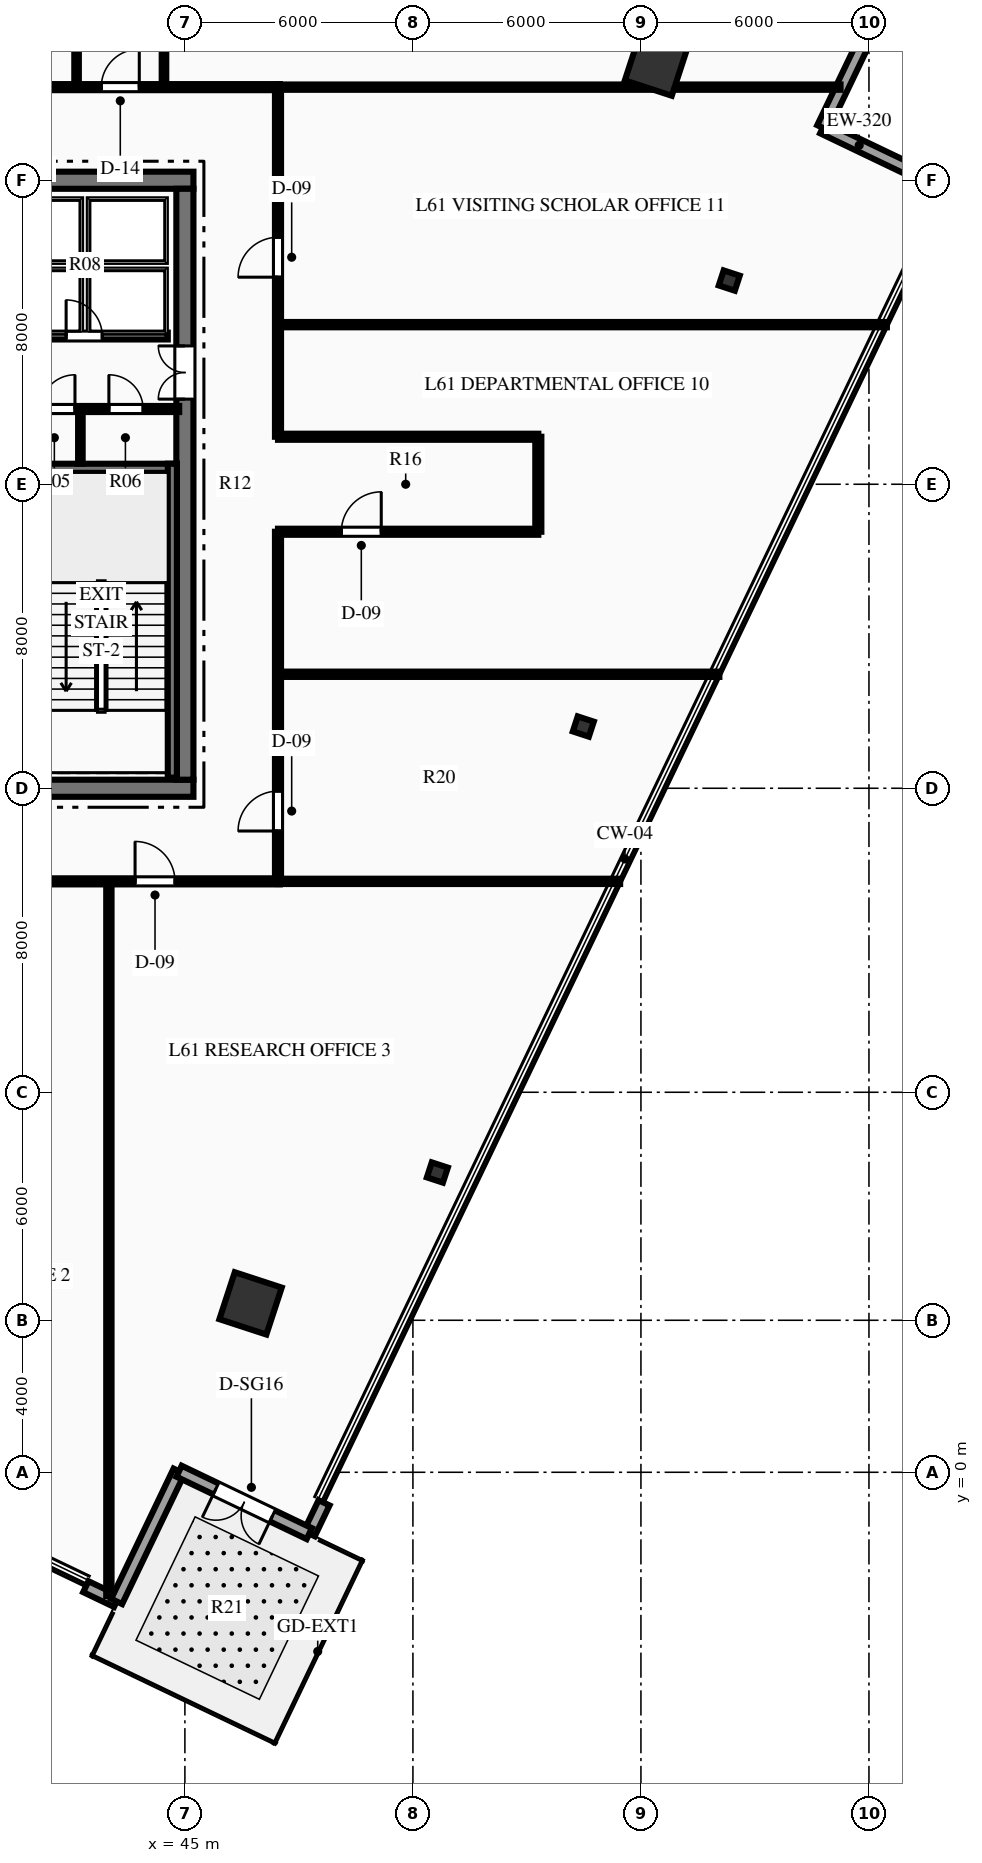
"""IFC4 building model, lengths in metres.
Left out: names, types, materials, properties, quantities, classifications, styles, units other than length and angle.
Written with IfcOpenShell. Run it as: python <this file> out.ifc"""

import sys

from ifc_helpers import new_model, si_unit, direction, frame, frame_2d, origin, origin_2d, place, context, subcontext, project, spatial, rectangle, hollow_rectangle, i_section, extrude, element, fill, save


model = new_model("IFC4")
c1 = context("Model", 3, precision=1e-05, world=origin(), true_north=direction((0.0, 1.0)))
c2 = subcontext(c1, "Body", "Model", "MODEL_VIEW")
j1 = project(units=[si_unit("LENGTHUNIT", "METRE"), si_unit("PLANEANGLEUNIT", "RADIAN")], contexts=[c1])
p1 = place(None, origin())
s1 = spatial("IfcSite", under=j1, at=p1, CompositionType="ELEMENT")
p2 = place(p1, origin())
s2 = spatial("IfcBuilding", under=s1, at=p2, CompositionType="ELEMENT")
p3 = place(p2, frame((0.0, 0.0, 244.2)))
s3 = spatial("IfcBuildingStorey", under=s2, at=p3, CompositionType="ELEMENT", Elevation=244.2)
p4 = place(p3, frame((26.775, 18.0, 0.0), z_axis=(0.0, 0.0, 1.0), x_axis=(1.0, 0.0, 0.0)))
e1 = element("IfcWall", 1, at=p4, inside=s3, PredefinedType="SHEAR", context=c2, shape_type="SweptSolid", body=[
    extrude(rectangle(XDim=18.45, YDim=0.45, at=frame_2d((9.225, 0.0))), origin(), (0.0, 0.0, 1.0), 4.5),
])
p5 = place(p4, frame((7.325, 0.0, 0.0)))
e2 = element("IfcOpeningElement", 2, at=p5, cuts=e1, PredefinedType="OPENING", context=c2, shape_type="SweptSolid", body=[
    extrude(rectangle(XDim=1.1, YDim=2.15, at=frame_2d((0.55, 1.075))), frame((0.0, 0.235, 0.0), z_axis=(0.0, -1.0, 0.0), x_axis=(1.0, 0.0, 0.0)), (0.0, 0.0, 1.0), 0.47),
])
p6 = place(p4, frame((10.025, 0.0, 0.0)))
e3 = element("IfcOpeningElement", 3, at=p6, cuts=e1, PredefinedType="OPENING", context=c2, shape_type="SweptSolid", body=[
    extrude(rectangle(XDim=1.1, YDim=2.15, at=frame_2d((0.55, 1.075))), frame((0.0, 0.235, 0.0), z_axis=(0.0, -1.0, 0.0), x_axis=(1.0, 0.0, 0.0)), (0.0, 0.0, 1.0), 0.47),
])
p7 = place(p3, frame((26.775, 34.0, 0.0), z_axis=(0.0, 0.0, 1.0), x_axis=(1.0, 0.0, 0.0)))
e4 = element("IfcWall", 4, at=p7, inside=s3, PredefinedType="SHEAR", context=c2, shape_type="SweptSolid", body=[
    extrude(rectangle(XDim=18.45, YDim=0.45, at=frame_2d((9.225, 0.0))), origin(), (0.0, 0.0, 1.0), 4.5),
])
p8 = place(p3, frame((45.0, 18.225, 0.0), z_axis=(0.0, 0.0, 1.0), x_axis=(0.0, 1.0, 0.0)))
e5 = element("IfcWall", 5, at=p8, inside=s3, PredefinedType="SHEAR", context=c2, shape_type="SweptSolid", body=[
    extrude(rectangle(XDim=15.55, YDim=0.45, at=frame_2d((7.775, 0.0))), origin(), (0.0, 0.0, 1.0), 4.5),
])
p9 = place(p8, frame((10.015, 0.0, 0.0)))
e6 = element("IfcOpeningElement", 6, at=p9, cuts=e5, PredefinedType="OPENING", context=c2, shape_type="SweptSolid", body=[
    extrude(rectangle(XDim=1.4, YDim=2.2, at=frame_2d((0.7, 1.1))), frame((0.0, 0.235, 0.0), z_axis=(0.0, -1.0, 0.0), x_axis=(1.0, 0.0, 0.0)), (0.0, 0.0, 1.0), 0.47),
])
p10 = place(p3, frame((40.81, 26.42, 0.0), z_axis=(0.0, 0.0, 1.0), x_axis=(1.0, 0.0, 0.0)))
e7 = element("IfcWall", 7, at=p10, inside=s3, PredefinedType="SHEAR", context=c2, shape_type="SweptSolid", body=[
    extrude(rectangle(XDim=3.98, YDim=0.24, at=frame_2d((1.99, 0.0))), origin(), (0.0, 0.0, 1.0), 4.5),
])
p11 = place(p3, frame((44.67, 18.28, 0.0), z_axis=(0.0, 0.0, 1.0), x_axis=(0.0, 1.0, 0.0)))
e8 = element("IfcWall", 8, at=p11, inside=s3, PredefinedType="SHEAR", context=c2, shape_type="SweptSolid", body=[
    extrude(rectangle(XDim=8.26, YDim=0.24, at=frame_2d((4.13, 0.0))), origin(), (0.0, 0.0, 1.0), 4.5),
])
for number, where, z_axis, x_axis in (
    (9, (46.728, 4.445, 0.0), (0.0, 0.0, 1.0), (0.311, 0.95, 0.0)),
    (10, (57.396, 37.043, 0.0), (0.0, 0.0, 1.0), (0.311, 0.95, 0.0)),
):
    element("IfcColumn", number, at=place(p3, frame(where, z_axis=z_axis, x_axis=x_axis)), inside=s3, PredefinedType="COLUMN", context=c2, shape_type="SweptSolid", body=[
        extrude(hollow_rectangle(XDim=1.3, YDim=1.3, WallThickness=0.06, at=origin_2d()), origin(), (0.0, 0.0, 1.0), 4.5),
    ])
for number, where, z_axis, x_axis in (
    (11, (51.643, 7.889, 0.0), (0.0, 0.0, 1.0), (0.311, 0.95, 0.0)),
    (12, (55.483, 19.624, 0.0), (0.0, 0.0, 1.0), (0.311, 0.95, 0.0)),
    (13, (59.324, 31.36, 0.0), (0.0, 0.0, 1.0), (0.311, 0.95, 0.0)),
):
    element("IfcColumn", number, at=place(p3, frame(where, z_axis=z_axis, x_axis=x_axis)), inside=s3, PredefinedType="COLUMN", context=c2, shape_type="SweptSolid", body=[
        extrude(i_section(OverallWidth=0.416, OverallDepth=0.445, WebThickness=0.039, FlangeThickness=0.063, at=origin_2d()), origin(), (0.0, 0.0, 1.0), 4.5),
    ])
p12 = place(p3, frame((48.662, -0.802, 0.0), z_axis=(0.0, 0.0, 1.0), x_axis=(-0.432069629268, -0.901840249414, 0.0)))
e14 = element("IfcWall", 14, at=p12, inside=s3, PredefinedType="STANDARD", context=c2, shape_type="SweptSolid", body=[
    extrude(rectangle(XDim=0.9, YDim=0.32, at=frame_2d((0.45, 0.0))), origin(), (0.0, 0.0, 1.0), 4.23),
])
p13 = place(p3, frame((61.784, 35.38, 0.0), z_axis=(0.0, 0.0, 1.0), x_axis=(0.901805596144, -0.432141952099, 0.0)))
e15 = element("IfcWall", 15, at=p13, inside=s3, PredefinedType="STANDARD", context=c2, shape_type="SweptSolid", body=[
    extrude(rectangle(XDim=3.8, YDim=0.32, at=frame_2d((1.9, 0.0))), origin(), (0.0, 0.0, 1.0), 4.23),
])
p14 = place(p3, frame((63.426, 38.807, 0.0), z_axis=(0.0, 0.0, 1.0), x_axis=(-0.432064663211, -0.901842628624, 0.0)))
e16 = element("IfcWall", 16, at=p14, inside=s3, PredefinedType="STANDARD", context=c2, shape_type="SweptSolid", body=[
    extrude(rectangle(XDim=3.8, YDim=0.32, at=frame_2d((1.9, 0.0))), origin(), (0.0, 0.0, 1.0), 4.23),
])
p15 = place(p3, frame((43.204, -3.399, 0.0), z_axis=(0.0, 0.0, 1.0), x_axis=(-0.901789596457, 0.432175339096, 0.0)))
e17 = element("IfcWall", 17, at=p15, inside=s3, PredefinedType="STANDARD", context=c2, shape_type="SweptSolid", body=[
    extrude(rectangle(XDim=0.9, YDim=0.32, at=frame_2d((0.45, 0.0))), origin(), (0.0, 0.0, 1.0), 4.23),
])
p16 = place(p3, frame((44.846, 0.028, 0.0), z_axis=(0.0, 0.0, 1.0), x_axis=(-0.432064663211, -0.901842628624, 0.0)))
e18 = element("IfcWall", 18, at=p16, inside=s3, PredefinedType="STANDARD", context=c2, shape_type="SweptSolid", body=[
    extrude(rectangle(XDim=3.8, YDim=0.32, at=frame_2d((1.9, 0.0))), origin(), (0.0, 0.0, 1.0), 4.23),
])
p17 = place(p3, frame((48.273, -1.614, 0.0), z_axis=(0.0, 0.0, 1.0), x_axis=(-0.901817593476, 0.432116914848, 0.0)))
e19 = element("IfcWall", 19, at=p17, inside=s3, PredefinedType="STANDARD", context=c2, shape_type="SweptSolid", body=[
    extrude(rectangle(XDim=3.8, YDim=0.32, at=frame_2d((1.9, 0.0))), origin(), (0.0, 0.0, 1.0), 4.23),
])
p18 = place(p17, frame((1.075, 0.0, 0.0)))
e20 = element("IfcOpeningElement", 20, at=p18, cuts=e19, PredefinedType="OPENING", context=c2, shape_type="SweptSolid", body=[
    extrude(rectangle(XDim=1.65, YDim=2.35, at=frame_2d((0.825, 1.175))), frame((0.0, 0.17, 0.0), z_axis=(0.0, -1.0, 0.0), x_axis=(1.0, 0.0, 0.0)), (0.0, 0.0, 1.0), 0.34),
])
p19 = place(p3, frame((40.8, 27.98, 0.0), z_axis=(0.0, 0.0, 1.0), x_axis=(1.0, 0.0, 0.0)))
e21 = element("IfcWall", 21, at=p19, inside=s3, PredefinedType="PARTITIONING", context=c2, shape_type="SweptSolid", body=[
    extrude(rectangle(XDim=4.05, YDim=0.16, at=frame_2d((2.025, 0.0))), origin(), (0.0, 0.0, 1.0), 4.23),
])
p20 = place(p19, frame((0.407, 0.0, 0.0)))
e22 = element("IfcOpeningElement", 22, at=p20, cuts=e21, PredefinedType="OPENING", context=c2, shape_type="SweptSolid", body=[
    extrude(rectangle(XDim=0.9, YDim=2.15, at=frame_2d((0.45, 1.075))), frame((0.0, 0.09, 0.0), z_axis=(0.0, -1.0, 0.0), x_axis=(1.0, 0.0, 0.0)), (0.0, 0.0, 1.0), 0.18),
])
p21 = place(p19, frame((2.2, 0.0, 0.0)))
e23 = element("IfcOpeningElement", 23, at=p21, cuts=e21, PredefinedType="OPENING", context=c2, shape_type="SweptSolid", body=[
    extrude(rectangle(XDim=0.9, YDim=2.15, at=frame_2d((0.45, 1.075))), frame((0.0, 0.09, 0.0), z_axis=(0.0, -1.0, 0.0), x_axis=(1.0, 0.0, 0.0)), (0.0, 0.0, 1.0), 0.18),
])
p22 = place(p3, frame((42.25, 26.54, 0.0), z_axis=(0.0, 0.0, 1.0), x_axis=(0.0, 1.0, 0.0)))
e24 = element("IfcWall", 24, at=p22, inside=s3, PredefinedType="PARTITIONING", context=c2, shape_type="SweptSolid", body=[
    extrude(rectangle(XDim=1.44, YDim=0.12, at=frame_2d((0.72, 0.0))), origin(), (0.0, 0.0, 1.0), 4.23),
])
p23 = place(p3, frame((40.12, 29.9, 0.0), z_axis=(0.0, 0.0, 1.0), x_axis=(1.0, 0.0, 0.0)))
e25 = element("IfcWall", 25, at=p23, inside=s3, PredefinedType="PARTITIONING", context=c2, shape_type="SweptSolid", body=[
    extrude(rectangle(XDim=4.43, YDim=0.18, at=frame_2d((2.215, 0.0))), origin(), (0.0, 0.0, 1.0), 4.23),
])
p24 = place(p23, frame((1.755, 0.0, 0.0)))
e26 = element("IfcOpeningElement", 26, at=p24, cuts=e25, PredefinedType="OPENING", context=c2, shape_type="SweptSolid", body=[
    extrude(rectangle(XDim=0.95, YDim=2.15, at=frame_2d((0.475, 1.075))), frame((0.0, 0.1, 0.0), z_axis=(0.0, -1.0, 0.0), x_axis=(1.0, 0.0, 0.0)), (0.0, 0.0, 1.0), 0.2),
])
p25 = place(p3, frame((37.25, 15.55, 0.0), z_axis=(0.0, 0.0, 1.0), x_axis=(1.0, 0.0, 0.0)))
e27 = element("IfcWall", 27, at=p25, inside=s3, PredefinedType="PARTITIONING", context=c2, shape_type="SweptSolid", body=[
    extrude(rectangle(XDim=10.25, YDim=0.16, at=frame_2d((5.125, 0.0))), origin(), (0.0, 0.0, 1.0), 4.23),
])
p26 = place(p25, frame((6.439, 0.0, 0.0)))
e28 = element("IfcOpeningElement", 28, at=p26, cuts=e27, PredefinedType="OPENING", context=c2, shape_type="SweptSolid", body=[
    extrude(rectangle(XDim=1.05, YDim=2.15, at=frame_2d((0.525, 1.075))), frame((0.0, 0.09, 0.0), z_axis=(0.0, -1.0, 0.0), x_axis=(1.0, 0.0, 0.0)), (0.0, 0.0, 1.0), 0.18),
])
p27 = place(p3, frame((37.25, 36.45, 0.0), z_axis=(0.0, 0.0, 1.0), x_axis=(1.0, 0.0, 0.0)))
e29 = element("IfcWall", 29, at=p27, inside=s3, PredefinedType="PARTITIONING", context=c2, shape_type="SweptSolid", body=[
    extrude(rectangle(XDim=10.25, YDim=0.16, at=frame_2d((5.125, 0.0))), origin(), (0.0, 0.0, 1.0), 4.23),
])
p28 = place(p27, frame((1.0, 0.0, 0.0)))
e30 = element("IfcOpeningElement", 30, at=p28, cuts=e29, PredefinedType="OPENING", context=c2, shape_type="SweptSolid", body=[
    extrude(rectangle(XDim=0.9, YDim=2.15, at=frame_2d((0.45, 1.075))), frame((0.0, 0.09, 0.0), z_axis=(0.0, -1.0, 0.0), x_axis=(1.0, 0.0, 0.0)), (0.0, 0.0, 1.0), 0.18),
])
p29 = place(p27, frame((3.3, 0.0, 0.0)))
e31 = element("IfcOpeningElement", 31, at=p29, cuts=e29, PredefinedType="OPENING", context=c2, shape_type="SweptSolid", body=[
    extrude(rectangle(XDim=0.9, YDim=2.15, at=frame_2d((0.45, 1.075))), frame((0.0, 0.09, 0.0), z_axis=(0.0, -1.0, 0.0), x_axis=(1.0, 0.0, 0.0)), (0.0, 0.0, 1.0), 0.18),
])
p30 = place(p27, frame((5.55, 0.0, 0.0)))
e32 = element("IfcOpeningElement", 32, at=p30, cuts=e29, PredefinedType="OPENING", context=c2, shape_type="SweptSolid", body=[
    extrude(rectangle(XDim=1.0, YDim=2.15, at=frame_2d((0.5, 1.075))), frame((0.0, 0.09, 0.0), z_axis=(0.0, -1.0, 0.0), x_axis=(1.0, 0.0, 0.0)), (0.0, 0.0, 1.0), 0.18),
])
p31 = place(p3, frame((47.45, 15.55, 0.0), z_axis=(0.0, 0.0, 1.0), x_axis=(0.0, 1.0, 0.0)))
e33 = element("IfcWall", 33, at=p31, inside=s3, PredefinedType="PARTITIONING", context=c2, shape_type="SweptSolid", body=[
    extrude(rectangle(XDim=9.2, YDim=0.16, at=frame_2d((4.6, 0.0))), origin(), (0.0, 0.0, 1.0), 4.23),
])
p32 = place(p31, frame((1.325, 0.0, 0.0)))
e34 = element("IfcOpeningElement", 34, at=p32, cuts=e33, PredefinedType="OPENING", context=c2, shape_type="SweptSolid", body=[
    extrude(rectangle(XDim=1.05, YDim=2.15, at=frame_2d((0.525, 1.075))), frame((0.0, 0.09, 0.0), z_axis=(0.0, -1.0, 0.0), x_axis=(1.0, 0.0, 0.0)), (0.0, 0.0, 1.0), 0.18),
])
p33 = place(p3, frame((47.45, 27.25, 0.0), z_axis=(0.0, 0.0, 1.0), x_axis=(0.0, 1.0, 0.0)))
e35 = element("IfcWall", 35, at=p33, inside=s3, PredefinedType="PARTITIONING", context=c2, shape_type="SweptSolid", body=[
    extrude(rectangle(XDim=9.2, YDim=0.16, at=frame_2d((4.6, 0.0))), origin(), (0.0, 0.0, 1.0), 4.23),
])
p34 = place(p33, frame((4.199, 0.0, 0.0)))
e36 = element("IfcOpeningElement", 36, at=p34, cuts=e35, PredefinedType="OPENING", context=c2, shape_type="SweptSolid", body=[
    extrude(rectangle(XDim=1.05, YDim=2.15, at=frame_2d((0.525, 1.075))), frame((0.0, 0.09, 0.0), z_axis=(0.0, -1.0, 0.0), x_axis=(1.0, 0.0, 0.0)), (0.0, 0.0, 1.0), 0.18),
])
p35 = place(p3, frame((47.45, 24.75, 0.0), z_axis=(0.0, 0.0, 1.0), x_axis=(1.0, 0.0, 0.0)))
e37 = element("IfcWall", 37, at=p35, inside=s3, PredefinedType="PARTITIONING", context=c2, shape_type="SweptSolid", body=[
    extrude(rectangle(XDim=6.85, YDim=0.16, at=frame_2d((3.425, 0.0))), origin(), (0.0, 0.0, 1.0), 4.23),
])
p36 = place(p35, frame((1.667, 0.0, 0.0)))
e38 = element("IfcOpeningElement", 38, at=p36, cuts=e37, PredefinedType="OPENING", context=c2, shape_type="SweptSolid", body=[
    extrude(rectangle(XDim=1.05, YDim=2.15, at=frame_2d((0.525, 1.075))), frame((0.0, 0.09, 0.0), z_axis=(0.0, -1.0, 0.0), x_axis=(1.0, 0.0, 0.0)), (0.0, 0.0, 1.0), 0.18),
])
p37 = place(p3, frame((47.45, 27.25, 0.0), z_axis=(0.0, 0.0, 1.0), x_axis=(1.0, 0.0, 0.0)))
e39 = element("IfcWall", 39, at=p37, inside=s3, PredefinedType="PARTITIONING", context=c2, shape_type="SweptSolid", body=[
    extrude(rectangle(XDim=6.85, YDim=0.16, at=frame_2d((3.425, 0.0))), origin(), (0.0, 0.0, 1.0), 4.23),
])
p38 = place(p3, frame((54.3, 24.75, 0.0), z_axis=(0.0, 0.0, 1.0), x_axis=(0.0, 1.0, 0.0)))
e40 = element("IfcWall", 40, at=p38, inside=s3, PredefinedType="PARTITIONING", context=c2, shape_type="SweptSolid", body=[
    extrude(rectangle(XDim=2.5, YDim=0.16, at=frame_2d((1.25, 0.0))), origin(), (0.0, 0.0, 1.0), 4.23),
])
for number, where, z_axis, x_axis in (
    (41, (42.15, 36.45, 0.0), (0.0, 0.0, 1.0), (0.0, 1.0, 0.0)),
    (42, (44.45, 36.45, 0.0), (0.0, 0.0, 1.0), (0.0, 1.0, 0.0)),
):
    element("IfcWall", number, at=place(p3, frame(where, z_axis=z_axis, x_axis=x_axis)), inside=s3, PredefinedType="PARTITIONING", context=c2, shape_type="SweptSolid", body=[
        extrude(rectangle(XDim=3.9, YDim=0.12, at=frame_2d((1.95, 0.0))), origin(), (0.0, 0.0, 1.0), 4.23),
    ])
p39 = place(p3, frame((47.45, 15.55, 0.0), z_axis=(0.0, 0.0, 1.0), x_axis=(1.0, 0.0, 0.0)))
e43 = element("IfcWall", 43, at=p39, inside=s3, PredefinedType="PARTITIONING", context=c2, shape_type="SweptSolid", body=[
    extrude(rectangle(XDim=9.002, YDim=0.14, at=frame_2d((4.501, 0.0))), origin(), (0.0, 0.0, 1.0), 4.23),
])
p40 = place(p3, frame((47.45, 36.45, 0.0), z_axis=(0.0, 0.0, 1.0), x_axis=(1.0, 0.0, 0.0)))
e44 = element("IfcWall", 44, at=p40, inside=s3, PredefinedType="PARTITIONING", context=c2, shape_type="SweptSolid", body=[
    extrude(rectangle(XDim=14.802, YDim=0.14, at=frame_2d((7.401, 0.0))), origin(), (0.0, 0.0, 1.0), 3.608),
])
p41 = place(p3, frame((43.0, -3.257, 0.0), z_axis=(0.0, 0.0, 1.0), x_axis=(0.0, 1.0, 0.0)))
e45 = element("IfcWall", 45, at=p41, inside=s3, PredefinedType="PARTITIONING", context=c2, shape_type="SweptSolid", body=[
    extrude(rectangle(XDim=18.807, YDim=0.14, at=frame_2d((9.403, 0.0))), origin(), (0.0, 0.0, 1.0), 4.23),
])
p42 = place(p3, frame((47.45, 21.0, 0.0), z_axis=(0.0, 0.0, 1.0), x_axis=(1.0, 0.0, 0.0)))
e46 = element("IfcWall", 46, at=p42, inside=s3, PredefinedType="PARTITIONING", context=c2, shape_type="SweptSolid", body=[
    extrude(rectangle(XDim=11.614, YDim=0.14, at=frame_2d((5.807, 0.0))), origin(), (0.0, 0.0, 1.0), 4.23),
])
p43 = place(p3, frame((47.45, 30.2, 0.0), z_axis=(0.0, 0.0, 1.0), x_axis=(1.0, 0.0, 0.0)))
e47 = element("IfcWall", 47, at=p43, inside=s3, PredefinedType="PARTITIONING", context=c2, shape_type="SweptSolid", body=[
    extrude(rectangle(XDim=16.022, YDim=0.14, at=frame_2d((8.011, 0.0))), origin(), (0.0, 0.0, 1.0), 4.23),
])
p44 = place(p18, origin())
e48 = element("IfcDoor", 48, at=p44, inside=s3, OperationType="DOUBLE_DOOR_SINGLE_SWING", PredefinedType="DOOR", context=c2, shape_type="SweptSolid", body=[
    extrude(rectangle(XDim=1.65, YDim=2.35, at=frame_2d((0.825, 1.175))), frame((0.0, 0.025, 0.0), z_axis=(0.0, -1.0, 0.0), x_axis=(1.0, 0.0, 0.0)), (0.0, 0.0, 1.0), 0.05),
])
fill(e20, e48)
p45 = place(p20, origin())
e49 = element("IfcDoor", 49, at=p45, inside=s3, OperationType="SINGLE_SWING_RIGHT", PredefinedType="DOOR", context=c2, shape_type="SweptSolid", body=[
    extrude(rectangle(XDim=0.9, YDim=2.15, at=frame_2d((0.45, 1.075))), frame((0.0, 0.025, 0.0), z_axis=(0.0, -1.0, 0.0), x_axis=(1.0, 0.0, 0.0)), (0.0, 0.0, 1.0), 0.05),
])
fill(e22, e49)
p46 = place(p21, origin())
e50 = element("IfcDoor", 50, at=p46, inside=s3, OperationType="SINGLE_SWING_LEFT", PredefinedType="DOOR", context=c2, shape_type="SweptSolid", body=[
    extrude(rectangle(XDim=0.9, YDim=2.15, at=frame_2d((0.45, 1.075))), frame((0.0, 0.025, 0.0), z_axis=(0.0, -1.0, 0.0), x_axis=(1.0, 0.0, 0.0)), (0.0, 0.0, 1.0), 0.05),
])
fill(e23, e50)
p47 = place(p24, origin())
e51 = element("IfcDoor", 51, at=p47, inside=s3, OperationType="SINGLE_SWING_LEFT", PredefinedType="DOOR", context=c2, shape_type="SweptSolid", body=[
    extrude(rectangle(XDim=0.95, YDim=2.15, at=frame_2d((0.475, 1.075))), frame((0.0, 0.025, 0.0), z_axis=(0.0, -1.0, 0.0), x_axis=(1.0, 0.0, 0.0)), (0.0, 0.0, 1.0), 0.05),
])
fill(e26, e51)
p48 = place(p9, origin())
e52 = element("IfcDoor", 52, at=p48, inside=s3, OperationType="DOUBLE_DOOR_SINGLE_SWING", PredefinedType="DOOR", context=c2, shape_type="SweptSolid", body=[
    extrude(rectangle(XDim=1.4, YDim=2.2, at=frame_2d((0.7, 1.1))), frame((0.0, 0.025, 0.0), z_axis=(0.0, -1.0, 0.0), x_axis=(1.0, 0.0, 0.0)), (0.0, 0.0, 1.0), 0.05),
])
fill(e6, e52)
p49 = place(p30, origin())
e53 = element("IfcDoor", 53, at=p49, inside=s3, OperationType="SINGLE_SWING_RIGHT", PredefinedType="DOOR", context=c2, shape_type="SweptSolid", body=[
    extrude(rectangle(XDim=1.0, YDim=2.15, at=frame_2d((0.5, 1.075))), frame((0.0, 0.025, 0.0), z_axis=(0.0, -1.0, 0.0), x_axis=(1.0, 0.0, 0.0)), (0.0, 0.0, 1.0), 0.05),
])
fill(e32, e53)
p50 = place(p26, origin())
e54 = element("IfcDoor", 54, at=p50, inside=s3, OperationType="SINGLE_SWING_LEFT", PredefinedType="DOOR", context=c2, shape_type="SweptSolid", body=[
    extrude(rectangle(XDim=1.05, YDim=2.15, at=frame_2d((0.525, 1.075))), frame((0.0, 0.025, 0.0), z_axis=(0.0, -1.0, 0.0), x_axis=(1.0, 0.0, 0.0)), (0.0, 0.0, 1.0), 0.05),
])
fill(e28, e54)
p51 = place(p32, origin())
e55 = element("IfcDoor", 55, at=p51, inside=s3, OperationType="SINGLE_SWING_LEFT", PredefinedType="DOOR", context=c2, shape_type="SweptSolid", body=[
    extrude(rectangle(XDim=1.05, YDim=2.15, at=frame_2d((0.525, 1.075))), frame((0.0, 0.025, 0.0), z_axis=(0.0, -1.0, 0.0), x_axis=(1.0, 0.0, 0.0)), (0.0, 0.0, 1.0), 0.05),
])
fill(e34, e55)
p52 = place(p36, origin())
e56 = element("IfcDoor", 56, at=p52, inside=s3, OperationType="SINGLE_SWING_RIGHT", PredefinedType="DOOR", context=c2, shape_type="SweptSolid", body=[
    extrude(rectangle(XDim=1.05, YDim=2.15, at=frame_2d((0.525, 1.075))), frame((0.0, 0.025, 0.0), z_axis=(0.0, -1.0, 0.0), x_axis=(1.0, 0.0, 0.0)), (0.0, 0.0, 1.0), 0.05),
])
fill(e38, e56)
p53 = place(p34, origin())
e57 = element("IfcDoor", 57, at=p53, inside=s3, OperationType="SINGLE_SWING_LEFT", PredefinedType="DOOR", context=c2, shape_type="SweptSolid", body=[
    extrude(rectangle(XDim=1.05, YDim=2.15, at=frame_2d((0.525, 1.075))), frame((0.0, 0.025, 0.0), z_axis=(0.0, -1.0, 0.0), x_axis=(1.0, 0.0, 0.0)), (0.0, 0.0, 1.0), 0.05),
])
fill(e36, e57)
save(model, sys.argv[1])
